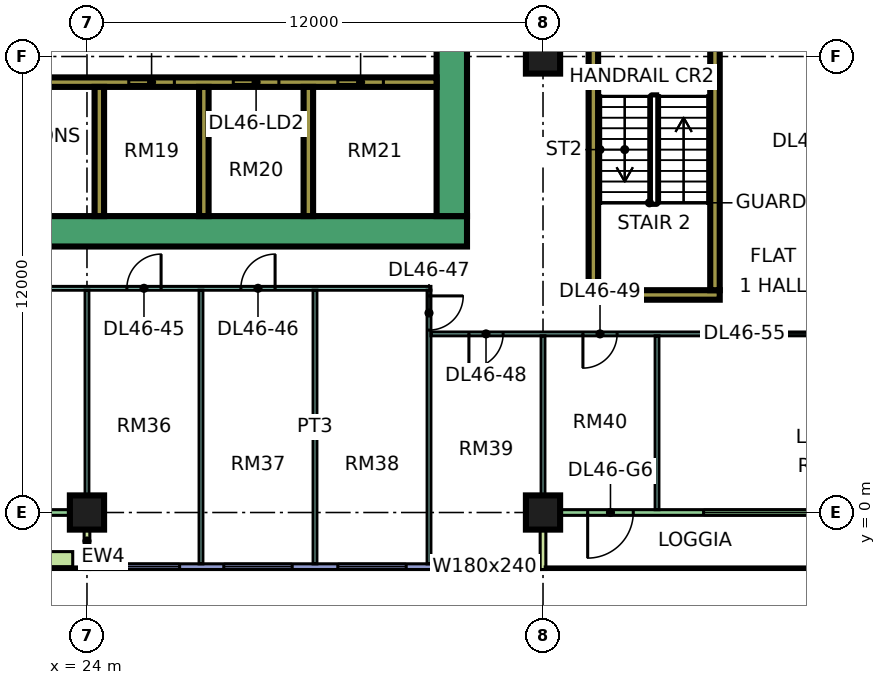
"""IFC4 building model, lengths in metres.
Left out: names, types, materials, properties, quantities, classifications, styles, units other than length and angle.
Written with IfcOpenShell. Run it as: python <this file> out.ifc"""

import sys

from ifc_helpers import new_model, si_unit, direction, frame, frame_2d, origin, origin_2d, place, context, subcontext, project, spatial, rectangle, extrude, element, fill, save


model = new_model("IFC4")
c1 = context("Model", 3, precision=1e-05, world=origin(), true_north=direction((0.0, 1.0)))
c2 = subcontext(c1, "Body", "Model", "MODEL_VIEW")
j1 = project(units=[si_unit("LENGTHUNIT", "METRE"), si_unit("PLANEANGLEUNIT", "RADIAN")], contexts=[c1])
p1 = place(None, origin())
s1 = spatial("IfcSite", under=j1, at=p1, CompositionType="ELEMENT")
p2 = place(p1, origin())
s2 = spatial("IfcBuilding", under=s1, at=p2, CompositionType="ELEMENT")
p3 = place(p2, frame((0.0, 0.0, 198.65)))
s3 = spatial("IfcBuildingStorey", under=s2, at=p3, CompositionType="ELEMENT", Elevation=198.65)
for number, where, z_axis, x_axis in (
    (1, (24.0, 0.0, 0.0), (0.0, 0.0, 1.0), (1.0, 0.0, 0.0)),
    (2, (36.0, 0.0, 0.0), (0.0, 0.0, 1.0), (1.0, 0.0, 0.0)),
    (3, (36.0, 12.0, 0.0), (0.0, 0.0, 1.0), (1.0, 0.0, 0.0)),
):
    element("IfcColumn", number, at=place(p3, frame(where, z_axis=z_axis, x_axis=x_axis)), inside=s3, PredefinedType="COLUMN", context=c2, shape_type="SweptSolid", body=[
        extrude(rectangle(XDim=0.9, YDim=0.9, at=origin_2d()), origin(), (0.0, 0.0, 1.0), 3.75),
    ])
p4 = place(p3, frame((9.0, 7.4, 0.0), z_axis=(0.0, 0.0, 1.0), x_axis=(1.0, 0.0, 0.0)))
e4 = element("IfcWall", 4, at=p4, inside=s3, PredefinedType="SHEAR", context=c2, shape_type="SweptSolid", body=[
    extrude(rectangle(XDim=25.0, YDim=0.8, at=frame_2d((12.5, 0.0))), origin(), (0.0, 0.0, 1.0), 3.75),
])
p5 = place(p3, frame((33.6, 7.8, 0.0), z_axis=(0.0, 0.0, 1.0), x_axis=(0.0, 1.0, 0.0)))
e5 = element("IfcWall", 5, at=p5, inside=s3, PredefinedType="SHEAR", context=c2, shape_type="SweptSolid", body=[
    extrude(rectangle(XDim=11.4, YDim=0.8, at=frame_2d((5.7, 0.0))), origin(), (0.0, 0.0, 1.0), 3.75),
])
p6 = place(p5, frame((5.4, 0.0, 0.0)))
e6 = element("IfcOpeningElement", 6, at=p6, cuts=e5, PredefinedType="OPENING", context=c2, shape_type="SweptSolid", body=[
    extrude(rectangle(XDim=1.8, YDim=2.4, at=frame_2d((0.9, 1.2))), frame((0.0, 0.41, 0.0), z_axis=(0.0, -1.0, 0.0), x_axis=(1.0, 0.0, 0.0)), (0.0, 0.0, 1.0), 0.82),
])
p7 = place(p3, frame((13.45, 11.325, 0.0), z_axis=(0.0, 0.0, 1.0), x_axis=(1.0, 0.0, 0.0)))
e7 = element("IfcWall", 7, at=p7, inside=s3, PredefinedType="SHEAR", context=c2, shape_type="SweptSolid", body=[
    extrude(rectangle(XDim=19.75, YDim=0.25, at=frame_2d((9.875, 0.0))), origin(), (0.0, 0.0, 1.0), 3.75),
])
p8 = place(p7, frame((11.65, 0.0, 0.0)))
e8 = element("IfcOpeningElement", 8, at=p8, cuts=e7, PredefinedType="OPENING", context=c2, shape_type="SweptSolid", body=[
    extrude(rectangle(XDim=1.2, YDim=2.2, at=frame_2d((0.6, 1.1))), frame((0.0, 0.135, 0.0), z_axis=(0.0, -1.0, 0.0), x_axis=(1.0, 0.0, 0.0)), (0.0, 0.0, 1.0), 0.27),
])
p9 = place(p7, frame((14.4, 0.0, 0.0)))
e9 = element("IfcOpeningElement", 9, at=p9, cuts=e7, PredefinedType="OPENING", context=c2, shape_type="SweptSolid", body=[
    extrude(rectangle(XDim=1.2, YDim=2.2, at=frame_2d((0.6, 1.1))), frame((0.0, 0.135, 0.0), z_axis=(0.0, -1.0, 0.0), x_axis=(1.0, 0.0, 0.0)), (0.0, 0.0, 1.0), 0.27),
])
p10 = place(p7, frame((17.15, 0.0, 0.0)))
e10 = element("IfcOpeningElement", 10, at=p10, cuts=e7, PredefinedType="OPENING", context=c2, shape_type="SweptSolid", body=[
    extrude(rectangle(XDim=1.2, YDim=2.2, at=frame_2d((0.6, 1.1))), frame((0.0, 0.135, 0.0), z_axis=(0.0, -1.0, 0.0), x_axis=(1.0, 0.0, 0.0)), (0.0, 0.0, 1.0), 0.27),
])
p11 = place(p7, frame((1.55, 0.0, 0.0)))
e11 = element("IfcOpeningElement", 11, at=p11, cuts=e7, PredefinedType="OPENING", context=c2, shape_type="SweptSolid", body=[
    extrude(rectangle(XDim=0.9, YDim=2.1, at=frame_2d((0.45, 1.05))), frame((0.0, 0.135, 0.0), z_axis=(0.0, -1.0, 0.0), x_axis=(1.0, 0.0, 0.0)), (0.0, 0.0, 1.0), 0.27),
])
p12 = place(p7, frame((6.925, 0.0, 0.0)))
e12 = element("IfcOpeningElement", 12, at=p12, cuts=e7, PredefinedType="OPENING", context=c2, shape_type="SweptSolid", body=[
    extrude(rectangle(XDim=0.9, YDim=2.1, at=frame_2d((0.45, 1.05))), frame((0.0, 0.135, 0.0), z_axis=(0.0, -1.0, 0.0), x_axis=(1.0, 0.0, 0.0)), (0.0, 0.0, 1.0), 0.27),
])
for number, where, z_axis, x_axis in (
    (13, (24.325, 7.8, 0.0), (0.0, 0.0, 1.0), (0.0, 1.0, 0.0)),
    (14, (27.075, 7.8, 0.0), (0.0, 0.0, 1.0), (0.0, 1.0, 0.0)),
    (15, (29.825, 7.8, 0.0), (0.0, 0.0, 1.0), (0.0, 1.0, 0.0)),
):
    element("IfcWall", number, at=place(p3, frame(where, z_axis=z_axis, x_axis=x_axis)), inside=s3, PredefinedType="SHEAR", context=c2, shape_type="SweptSolid", body=[
        extrude(rectangle(XDim=3.4, YDim=0.25, at=frame_2d((1.7, 0.0))), origin(), (0.0, 0.0, 1.0), 3.75),
    ])
p13 = place(p3, frame((37.2, 5.725, 0.0), z_axis=(0.0, 0.0, 1.0), x_axis=(1.0, 0.0, 0.0)))
e16 = element("IfcWall", 16, at=p13, inside=s3, PredefinedType="SHEAR", context=c2, shape_type="SweptSolid", body=[
    extrude(rectangle(XDim=3.45, YDim=0.25, at=frame_2d((1.725, 0.0))), origin(), (0.0, 0.0, 1.0), 3.75),
])
for number, where, z_axis, x_axis in (
    (17, (37.325, 5.85, 0.0), (0.0, 0.0, 1.0), (0.0, 1.0, 0.0)),
    (18, (40.525, 5.85, 0.0), (0.0, 0.0, 1.0), (0.0, 1.0, 0.0)),
):
    element("IfcWall", number, at=place(p3, frame(where, z_axis=z_axis, x_axis=x_axis)), inside=s3, PredefinedType="SHEAR", context=c2, shape_type="SweptSolid", body=[
        extrude(rectangle(XDim=6.5, YDim=0.25, at=frame_2d((3.25, 0.0))), origin(), (0.0, 0.0, 1.0), 3.75),
    ])
p14 = place(p3, frame((12.575, 0.0, 0.0), z_axis=(0.0, 0.0, 1.0), x_axis=(1.0, 0.0, 0.0)))
e19 = element("IfcWall", 19, at=p14, inside=s3, PredefinedType="SOLIDWALL", context=c2, shape_type="SweptSolid", body=[
    extrude(rectangle(XDim=11.35, YDim=0.15, at=frame_2d((5.675, 0.0))), origin(), (0.0, 0.0, 1.0), 3.35),
])
p15 = place(p14, frame((0.613, 0.0, 0.0)))
e20 = element("IfcOpeningElement", 20, at=p15, cuts=e19, PredefinedType="OPENING", context=c2, shape_type="SweptSolid", body=[
    extrude(rectangle(XDim=1.2, YDim=2.4, at=frame_2d((0.6, 1.2))), frame((0.0, 0.085, 0.0), z_axis=(0.0, -1.0, 0.0), x_axis=(1.0, 0.0, 0.0)), (0.0, 0.0, 1.0), 0.17),
])
p16 = place(p14, frame((5.15, 0.0, 0.45)))
e21 = element("IfcOpeningElement", 21, at=p16, cuts=e19, PredefinedType="OPENING", context=c2, shape_type="SweptSolid", body=[
    extrude(rectangle(XDim=3.0, YDim=2.4, at=frame_2d((1.5, 1.2))), frame((0.0, 0.085, 0.0), z_axis=(0.0, -1.0, 0.0), x_axis=(1.0, 0.0, 0.0)), (0.0, 0.0, 1.0), 0.17),
])
p17 = place(p3, frame((24.0, -1.5, 0.0), z_axis=(0.0, 0.0, 1.0), x_axis=(0.0, 1.0, 0.0)))
e22 = element("IfcWall", 22, at=p17, inside=s3, PredefinedType="SOLIDWALL", context=c2, shape_type="SweptSolid", body=[
    extrude(rectangle(XDim=1.5, YDim=0.15, at=frame_2d((0.75, 0.0))), origin(), (0.0, 0.0, 1.0), 3.35),
])
p18 = place(p3, frame((24.075, -1.425, 0.0), z_axis=(0.0, 0.0, 1.0), x_axis=(1.0, 0.0, 0.0)))
e23 = element("IfcWall", 23, at=p18, inside=s3, PredefinedType="SOLIDWALL", context=c2, shape_type="SweptSolid", body=[
    extrude(rectangle(XDim=11.85, YDim=0.15, at=frame_2d((5.925, 0.0))), origin(), (0.0, 0.0, 1.0), 3.35),
])
p19 = place(p18, frame((0.562, 0.0, 0.45)))
e24 = element("IfcOpeningElement", 24, at=p19, cuts=e23, PredefinedType="OPENING", context=c2, shape_type="SweptSolid", body=[
    extrude(rectangle(XDim=1.8, YDim=2.4, at=frame_2d((0.9, 1.2))), frame((0.0, 0.085, 0.0), z_axis=(0.0, -1.0, 0.0), x_axis=(1.0, 0.0, 0.0)), (0.0, 0.0, 1.0), 0.17),
])
p20 = place(p18, frame((3.525, 0.0, 0.45)))
e25 = element("IfcOpeningElement", 25, at=p20, cuts=e23, PredefinedType="OPENING", context=c2, shape_type="SweptSolid", body=[
    extrude(rectangle(XDim=1.8, YDim=2.4, at=frame_2d((0.9, 1.2))), frame((0.0, 0.085, 0.0), z_axis=(0.0, -1.0, 0.0), x_axis=(1.0, 0.0, 0.0)), (0.0, 0.0, 1.0), 0.17),
])
p21 = place(p18, frame((6.525, 0.0, 0.45)))
e26 = element("IfcOpeningElement", 26, at=p21, cuts=e23, PredefinedType="OPENING", context=c2, shape_type="SweptSolid", body=[
    extrude(rectangle(XDim=1.8, YDim=2.4, at=frame_2d((0.9, 1.2))), frame((0.0, 0.085, 0.0), z_axis=(0.0, -1.0, 0.0), x_axis=(1.0, 0.0, 0.0)), (0.0, 0.0, 1.0), 0.17),
])
p22 = place(p18, frame((9.488, 0.0, 0.45)))
e27 = element("IfcOpeningElement", 27, at=p22, cuts=e23, PredefinedType="OPENING", context=c2, shape_type="SweptSolid", body=[
    extrude(rectangle(XDim=1.8, YDim=2.4, at=frame_2d((0.9, 1.2))), frame((0.0, 0.085, 0.0), z_axis=(0.0, -1.0, 0.0), x_axis=(1.0, 0.0, 0.0)), (0.0, 0.0, 1.0), 0.17),
])
p23 = place(p3, frame((36.075, 0.0, 0.0), z_axis=(0.0, 0.0, 1.0), x_axis=(1.0, 0.0, 0.0)))
e28 = element("IfcWall", 28, at=p23, inside=s3, PredefinedType="SOLIDWALL", context=c2, shape_type="SweptSolid", body=[
    extrude(rectangle(XDim=11.85, YDim=0.15, at=frame_2d((5.925, 0.0))), origin(), (0.0, 0.0, 1.0), 3.35),
])
p24 = place(p23, frame((1.1, 0.0, 0.0)))
e29 = element("IfcOpeningElement", 29, at=p24, cuts=e28, PredefinedType="OPENING", context=c2, shape_type="SweptSolid", body=[
    extrude(rectangle(XDim=1.2, YDim=2.4, at=frame_2d((0.6, 1.2))), frame((0.0, 0.085, 0.0), z_axis=(0.0, -1.0, 0.0), x_axis=(1.0, 0.0, 0.0)), (0.0, 0.0, 1.0), 0.17),
])
p25 = place(p23, frame((4.15, 0.0, 0.45)))
e30 = element("IfcOpeningElement", 30, at=p25, cuts=e28, PredefinedType="OPENING", context=c2, shape_type="SweptSolid", body=[
    extrude(rectangle(XDim=3.0, YDim=2.4, at=frame_2d((1.5, 1.2))), frame((0.0, 0.085, 0.0), z_axis=(0.0, -1.0, 0.0), x_axis=(1.0, 0.0, 0.0)), (0.0, 0.0, 1.0), 0.17),
])
p26 = place(p23, frame((10.062, 0.0, 0.45)))
e31 = element("IfcOpeningElement", 31, at=p26, cuts=e28, PredefinedType="OPENING", context=c2, shape_type="SweptSolid", body=[
    extrude(rectangle(XDim=1.2, YDim=2.4, at=frame_2d((0.6, 1.2))), frame((0.0, 0.085, 0.0), z_axis=(0.0, -1.0, 0.0), x_axis=(1.0, 0.0, 0.0)), (0.0, 0.0, 1.0), 0.17),
])
p27 = place(p3, frame((36.0, -1.5, 0.0), z_axis=(0.0, 0.0, 1.0), x_axis=(0.0, 1.0, 0.0)))
e32 = element("IfcWall", 32, at=p27, inside=s3, PredefinedType="SOLIDWALL", context=c2, shape_type="SweptSolid", body=[
    extrude(rectangle(XDim=1.5, YDim=0.15, at=frame_2d((0.75, 0.0))), origin(), (0.0, 0.0, 1.0), 3.35),
])
p28 = place(p3, frame((12.875, -1.229, 0.0), z_axis=(0.0, 0.0, 1.0), x_axis=(1.0, 0.0, 0.0)))
e33 = element("IfcWall", 33, at=p28, inside=s3, PredefinedType="SOLIDWALL", context=c2, shape_type="SweptSolid", body=[
    extrude(rectangle(XDim=10.75, YDim=0.4, at=frame_2d((5.375, 0.0))), origin(), (0.0, 0.0, 1.0), 0.7),
])
p29 = place(p3, frame((11.95, 5.9, 0.0), z_axis=(0.0, 0.0, 1.0), x_axis=(1.0, 0.0, 0.0)))
e34 = element("IfcWall", 34, at=p29, inside=s3, PredefinedType="PARTITIONING", context=c2, shape_type="SweptSolid", body=[
    extrude(rectangle(XDim=21.1, YDim=0.1, at=frame_2d((10.55, 0.0))), origin(), (0.0, 0.0, 1.0), 3.35),
])
p30 = place(p29, frame((1.1, 0.0, 0.0)))
e35 = element("IfcOpeningElement", 35, at=p30, cuts=e34, PredefinedType="OPENING", context=c2, shape_type="SweptSolid", body=[
    extrude(rectangle(XDim=0.9, YDim=2.1, at=frame_2d((0.45, 1.05))), frame((0.0, 0.06, 0.0), z_axis=(0.0, -1.0, 0.0), x_axis=(1.0, 0.0, 0.0)), (0.0, 0.0, 1.0), 0.12),
])
p31 = place(p29, frame((13.1, 0.0, 0.0)))
e36 = element("IfcOpeningElement", 36, at=p31, cuts=e34, PredefinedType="OPENING", context=c2, shape_type="SweptSolid", body=[
    extrude(rectangle(XDim=0.9, YDim=2.1, at=frame_2d((0.45, 1.05))), frame((0.0, 0.06, 0.0), z_axis=(0.0, -1.0, 0.0), x_axis=(1.0, 0.0, 0.0)), (0.0, 0.0, 1.0), 0.12),
])
p32 = place(p29, frame((16.1, 0.0, 0.0)))
e37 = element("IfcOpeningElement", 37, at=p32, cuts=e34, PredefinedType="OPENING", context=c2, shape_type="SweptSolid", body=[
    extrude(rectangle(XDim=0.9, YDim=2.1, at=frame_2d((0.45, 1.05))), frame((0.0, 0.06, 0.0), z_axis=(0.0, -1.0, 0.0), x_axis=(1.0, 0.0, 0.0)), (0.0, 0.0, 1.0), 0.12),
])
p33 = place(p29, frame((7.1, 0.0, 0.0)))
e38 = element("IfcOpeningElement", 38, at=p33, cuts=e34, PredefinedType="OPENING", context=c2, shape_type="SweptSolid", body=[
    extrude(rectangle(XDim=0.9, YDim=2.1, at=frame_2d((0.45, 1.05))), frame((0.0, 0.06, 0.0), z_axis=(0.0, -1.0, 0.0), x_axis=(1.0, 0.0, 0.0)), (0.0, 0.0, 1.0), 0.12),
])
p34 = place(p3, frame((24.0, 0.0, 0.0), z_axis=(0.0, 0.0, 1.0), x_axis=(0.0, 1.0, 0.0)))
e39 = element("IfcWall", 39, at=p34, inside=s3, PredefinedType="PARTITIONING", context=c2, shape_type="SweptSolid", body=[
    extrude(rectangle(XDim=5.85, YDim=0.1, at=frame_2d((2.925, 0.0))), origin(), (0.0, 0.0, 1.0), 3.35),
])
for number, where, z_axis, x_axis in (
    (40, (27.0, -1.351, 0.0), (0.0, 0.0, 1.0), (0.0, 1.0, 0.0)),
    (41, (30.0, -1.351, 0.0), (0.0, 0.0, 1.0), (0.0, 1.0, 0.0)),
):
    element("IfcWall", number, at=place(p3, frame(where, z_axis=z_axis, x_axis=x_axis)), inside=s3, PredefinedType="PARTITIONING", context=c2, shape_type="SweptSolid", body=[
        extrude(rectangle(XDim=7.201, YDim=0.1, at=frame_2d((3.601, 0.0))), origin(), (0.0, 0.0, 1.0), 3.35),
    ])
p35 = place(p3, frame((33.0, -1.351, 0.0), z_axis=(0.0, 0.0, 1.0), x_axis=(0.0, 1.0, 0.0)))
e42 = element("IfcWall", 42, at=p35, inside=s3, PredefinedType="PARTITIONING", context=c2, shape_type="SweptSolid", body=[
    extrude(rectangle(XDim=7.201, YDim=0.1, at=frame_2d((3.601, 0.0))), origin(), (0.0, 0.0, 1.0), 3.35),
])
p36 = place(p35, frame((6.151, 0.0, 0.0)))
e43 = element("IfcOpeningElement", 43, at=p36, cuts=e42, PredefinedType="OPENING", context=c2, shape_type="SweptSolid", body=[
    extrude(rectangle(XDim=0.9, YDim=2.1, at=frame_2d((0.45, 1.05))), frame((0.0, 0.06, 0.0), z_axis=(0.0, -1.0, 0.0), x_axis=(1.0, 0.0, 0.0)), (0.0, 0.0, 1.0), 0.12),
])
p37 = place(p3, frame((33.05, 4.7, 0.0), z_axis=(0.0, 0.0, 1.0), x_axis=(1.0, 0.0, 0.0)))
e44 = element("IfcWall", 44, at=p37, inside=s3, PredefinedType="PARTITIONING", context=c2, shape_type="SweptSolid", body=[
    extrude(rectangle(XDim=14.85, YDim=0.1, at=frame_2d((7.425, 0.0))), origin(), (0.0, 0.0, 1.0), 3.35),
])
p38 = place(p37, frame((1.0, 0.0, 0.0)))
e45 = element("IfcOpeningElement", 45, at=p38, cuts=e44, PredefinedType="OPENING", context=c2, shape_type="SweptSolid", body=[
    extrude(rectangle(XDim=0.9, YDim=2.1, at=frame_2d((0.45, 1.05))), frame((0.0, 0.06, 0.0), z_axis=(0.0, -1.0, 0.0), x_axis=(1.0, 0.0, 0.0)), (0.0, 0.0, 1.0), 0.12),
])
p39 = place(p37, frame((4.0, 0.0, 0.0)))
e46 = element("IfcOpeningElement", 46, at=p39, cuts=e44, PredefinedType="OPENING", context=c2, shape_type="SweptSolid", body=[
    extrude(rectangle(XDim=0.9, YDim=2.1, at=frame_2d((0.45, 1.05))), frame((0.0, 0.06, 0.0), z_axis=(0.0, -1.0, 0.0), x_axis=(1.0, 0.0, 0.0)), (0.0, 0.0, 1.0), 0.12),
])
p40 = place(p37, frame((10.0, 0.0, 0.0)))
e47 = element("IfcOpeningElement", 47, at=p40, cuts=e44, PredefinedType="OPENING", context=c2, shape_type="SweptSolid", body=[
    extrude(rectangle(XDim=0.9, YDim=2.1, at=frame_2d((0.45, 1.05))), frame((0.0, 0.06, 0.0), z_axis=(0.0, -1.0, 0.0), x_axis=(1.0, 0.0, 0.0)), (0.0, 0.0, 1.0), 0.12),
])
p41 = place(p3, frame((36.0, 0.0, 0.0), z_axis=(0.0, 0.0, 1.0), x_axis=(0.0, 1.0, 0.0)))
e48 = element("IfcWall", 48, at=p41, inside=s3, PredefinedType="PARTITIONING", context=c2, shape_type="SweptSolid", body=[
    extrude(rectangle(XDim=4.65, YDim=0.1, at=frame_2d((2.325, 0.0))), origin(), (0.0, 0.0, 1.0), 3.35),
])
p42 = place(p3, frame((39.0, 0.074, 0.0), z_axis=(0.0, 0.0, 1.0), x_axis=(0.0, 1.0, 0.0)))
e49 = element("IfcWall", 49, at=p42, inside=s3, PredefinedType="PARTITIONING", context=c2, shape_type="SweptSolid", body=[
    extrude(rectangle(XDim=4.576, YDim=0.1, at=frame_2d((2.288, 0.0))), origin(), (0.0, 0.0, 1.0), 3.35),
])
p43 = place(p19, origin())
e50 = element("IfcWindow", 50, at=p43, inside=s3, PartitioningType="SINGLE_PANEL", PredefinedType="WINDOW", context=c2, shape_type="SweptSolid", body=[
    extrude(rectangle(XDim=1.8, YDim=2.4, at=frame_2d((0.9, 1.2))), frame((0.0, 0.03, 0.0), z_axis=(0.0, -1.0, 0.0), x_axis=(1.0, 0.0, 0.0)), (0.0, 0.0, 1.0), 0.06),
])
fill(e24, e50)
p44 = place(p20, origin())
e51 = element("IfcWindow", 51, at=p44, inside=s3, PartitioningType="SINGLE_PANEL", PredefinedType="WINDOW", context=c2, shape_type="SweptSolid", body=[
    extrude(rectangle(XDim=1.8, YDim=2.4, at=frame_2d((0.9, 1.2))), frame((0.0, 0.03, 0.0), z_axis=(0.0, -1.0, 0.0), x_axis=(1.0, 0.0, 0.0)), (0.0, 0.0, 1.0), 0.06),
])
fill(e25, e51)
p45 = place(p21, origin())
e52 = element("IfcWindow", 52, at=p45, inside=s3, PartitioningType="SINGLE_PANEL", PredefinedType="WINDOW", context=c2, shape_type="SweptSolid", body=[
    extrude(rectangle(XDim=1.8, YDim=2.4, at=frame_2d((0.9, 1.2))), frame((0.0, 0.03, 0.0), z_axis=(0.0, -1.0, 0.0), x_axis=(1.0, 0.0, 0.0)), (0.0, 0.0, 1.0), 0.06),
])
fill(e26, e52)
p46 = place(p22, origin())
e53 = element("IfcWindow", 53, at=p46, inside=s3, PartitioningType="SINGLE_PANEL", PredefinedType="WINDOW", context=c2, shape_type="SweptSolid", body=[
    extrude(rectangle(XDim=1.8, YDim=2.4, at=frame_2d((0.9, 1.2))), frame((0.0, 0.03, 0.0), z_axis=(0.0, -1.0, 0.0), x_axis=(1.0, 0.0, 0.0)), (0.0, 0.0, 1.0), 0.06),
])
fill(e27, e53)
p47 = place(p24, frame((1.2, 0.0, 0.0), z_axis=(0.0, 0.0, 1.0), x_axis=(-1.0, 0.0, 0.0)))
e54 = element("IfcDoor", 54, at=p47, inside=s3, OperationType="DOUBLE_DOOR_SINGLE_SWING", PredefinedType="DOOR", context=c2, shape_type="SweptSolid", body=[
    extrude(rectangle(XDim=1.2, YDim=2.4, at=frame_2d((0.6, 1.2))), frame((0.0, 0.025, 0.0), z_axis=(0.0, -1.0, 0.0), x_axis=(1.0, 0.0, 0.0)), (0.0, 0.0, 1.0), 0.05),
])
fill(e29, e54)
p48 = place(p25, origin())
e55 = element("IfcWindow", 55, at=p48, inside=s3, PartitioningType="SINGLE_PANEL", PredefinedType="WINDOW", context=c2, shape_type="SweptSolid", body=[
    extrude(rectangle(XDim=3.0, YDim=2.4, at=frame_2d((1.5, 1.2))), frame((0.0, 0.03, 0.0), z_axis=(0.0, -1.0, 0.0), x_axis=(1.0, 0.0, 0.0)), (0.0, 0.0, 1.0), 0.06),
])
fill(e30, e55)
p49 = place(p8, origin())
e56 = element("IfcDoor", 56, at=p49, inside=s3, OperationType="DOUBLE_DOOR_SLIDING", PredefinedType="DOOR", context=c2, shape_type="SweptSolid", body=[
    extrude(rectangle(XDim=1.2, YDim=2.2, at=frame_2d((0.6, 1.1))), frame((0.0, 0.025, 0.0), z_axis=(0.0, -1.0, 0.0), x_axis=(1.0, 0.0, 0.0)), (0.0, 0.0, 1.0), 0.05),
])
fill(e8, e56)
p50 = place(p9, origin())
e57 = element("IfcDoor", 57, at=p50, inside=s3, OperationType="DOUBLE_DOOR_SLIDING", PredefinedType="DOOR", context=c2, shape_type="SweptSolid", body=[
    extrude(rectangle(XDim=1.2, YDim=2.2, at=frame_2d((0.6, 1.1))), frame((0.0, 0.025, 0.0), z_axis=(0.0, -1.0, 0.0), x_axis=(1.0, 0.0, 0.0)), (0.0, 0.0, 1.0), 0.05),
])
fill(e9, e57)
p51 = place(p10, origin())
e58 = element("IfcDoor", 58, at=p51, inside=s3, OperationType="DOUBLE_DOOR_SLIDING", PredefinedType="DOOR", context=c2, shape_type="SweptSolid", body=[
    extrude(rectangle(XDim=1.2, YDim=2.2, at=frame_2d((0.6, 1.1))), frame((0.0, 0.025, 0.0), z_axis=(0.0, -1.0, 0.0), x_axis=(1.0, 0.0, 0.0)), (0.0, 0.0, 1.0), 0.05),
])
fill(e10, e58)
p52 = place(p31, frame((0.9, 0.0, 0.0), z_axis=(0.0, 0.0, 1.0), x_axis=(-1.0, 0.0, 0.0)))
e59 = element("IfcDoor", 59, at=p52, inside=s3, OperationType="SINGLE_SWING_RIGHT", PredefinedType="DOOR", context=c2, shape_type="SweptSolid", body=[
    extrude(rectangle(XDim=0.9, YDim=2.1, at=frame_2d((0.45, 1.05))), frame((0.0, 0.025, 0.0), z_axis=(0.0, -1.0, 0.0), x_axis=(1.0, 0.0, 0.0)), (0.0, 0.0, 1.0), 0.05),
])
fill(e36, e59)
p53 = place(p32, frame((0.9, 0.0, 0.0), z_axis=(0.0, 0.0, 1.0), x_axis=(-1.0, 0.0, 0.0)))
e60 = element("IfcDoor", 60, at=p53, inside=s3, OperationType="SINGLE_SWING_RIGHT", PredefinedType="DOOR", context=c2, shape_type="SweptSolid", body=[
    extrude(rectangle(XDim=0.9, YDim=2.1, at=frame_2d((0.45, 1.05))), frame((0.0, 0.025, 0.0), z_axis=(0.0, -1.0, 0.0), x_axis=(1.0, 0.0, 0.0)), (0.0, 0.0, 1.0), 0.05),
])
fill(e37, e60)
p54 = place(p36, origin())
e61 = element("IfcDoor", 61, at=p54, inside=s3, OperationType="SINGLE_SWING_RIGHT", PredefinedType="DOOR", context=c2, shape_type="SweptSolid", body=[
    extrude(rectangle(XDim=0.9, YDim=2.1, at=frame_2d((0.45, 1.05))), frame((0.0, 0.025, 0.0), z_axis=(0.0, -1.0, 0.0), x_axis=(1.0, 0.0, 0.0)), (0.0, 0.0, 1.0), 0.05),
])
fill(e43, e61)
p55 = place(p38, frame((0.9, 0.0, 0.0), z_axis=(0.0, 0.0, 1.0), x_axis=(-1.0, 0.0, 0.0)))
e62 = element("IfcDoor", 62, at=p55, inside=s3, OperationType="SINGLE_SWING_LEFT", PredefinedType="DOOR", context=c2, shape_type="SweptSolid", body=[
    extrude(rectangle(XDim=0.9, YDim=2.1, at=frame_2d((0.45, 1.05))), frame((0.0, 0.025, 0.0), z_axis=(0.0, -1.0, 0.0), x_axis=(1.0, 0.0, 0.0)), (0.0, 0.0, 1.0), 0.05),
])
fill(e45, e62)
p56 = place(p39, frame((0.9, 0.0, 0.0), z_axis=(0.0, 0.0, 1.0), x_axis=(-1.0, 0.0, 0.0)))
e63 = element("IfcDoor", 63, at=p56, inside=s3, OperationType="SINGLE_SWING_LEFT", PredefinedType="DOOR", context=c2, shape_type="SweptSolid", body=[
    extrude(rectangle(XDim=0.9, YDim=2.1, at=frame_2d((0.45, 1.05))), frame((0.0, 0.025, 0.0), z_axis=(0.0, -1.0, 0.0), x_axis=(1.0, 0.0, 0.0)), (0.0, 0.0, 1.0), 0.05),
])
fill(e46, e63)
save(model, sys.argv[1])
